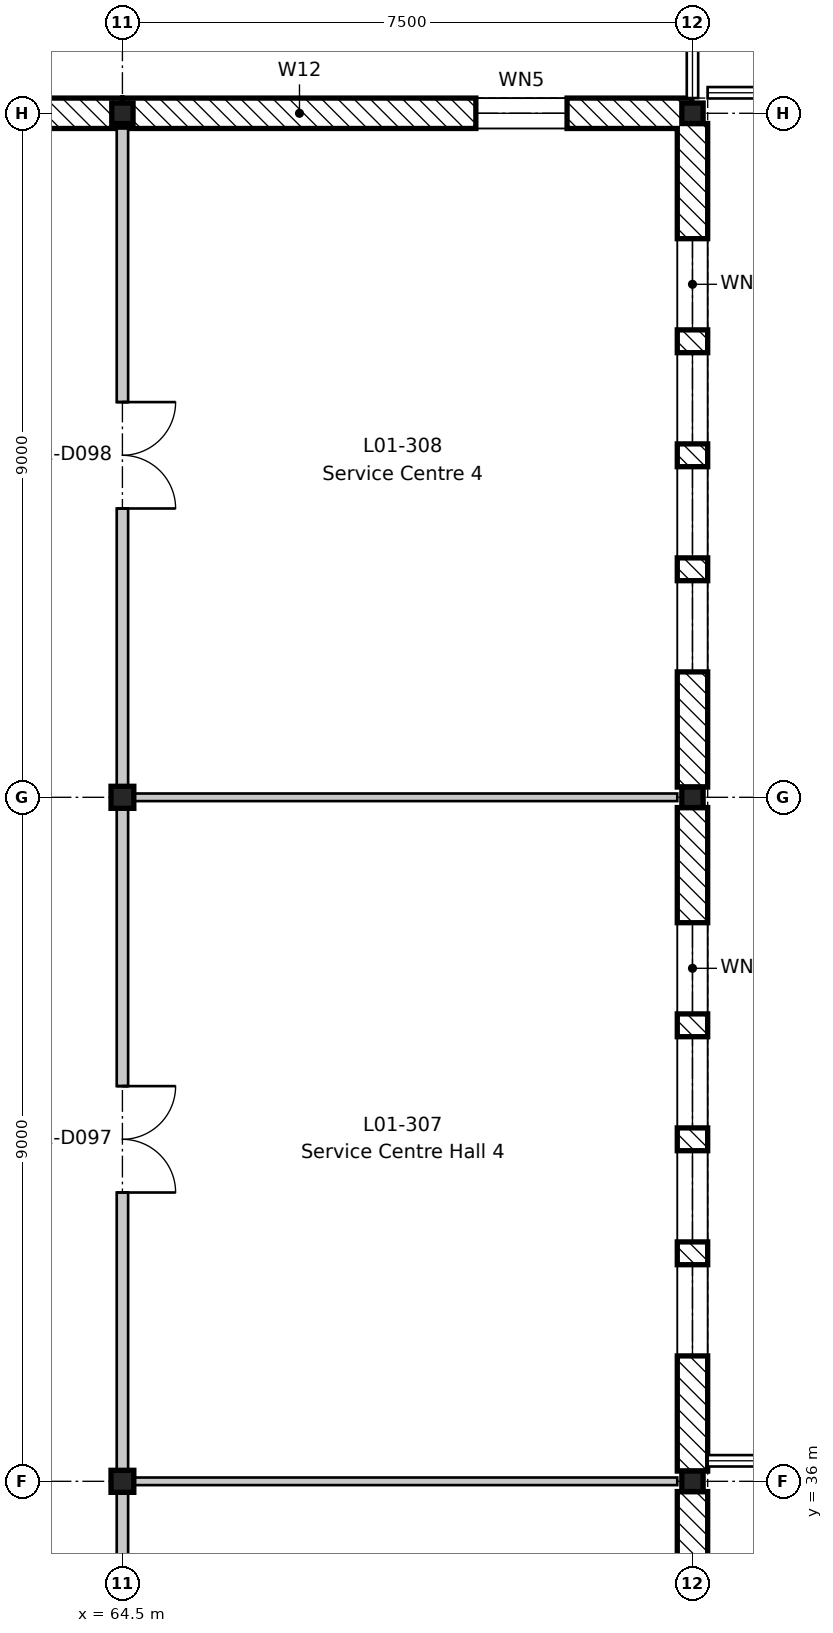
"""IFC4 building model, lengths in metres.
Left out: names, types, materials, properties, quantities, classifications, styles, units other than length and angle.
Written with IfcOpenShell. Run it as: python <this file> out.ifc"""

import sys

from ifc_helpers import new_model, si_unit, direction, frame, frame_2d, origin, origin_2d, place, context, subcontext, project, spatial, rectangle, i_section, extrude, element, fill, save


model = new_model("IFC4")
c1 = context("Model", 3, precision=1e-05, world=origin(), true_north=direction((0.0, 1.0)))
c2 = subcontext(c1, "Body", "Model", "MODEL_VIEW")
j1 = project(units=[si_unit("LENGTHUNIT", "METRE"), si_unit("PLANEANGLEUNIT", "RADIAN")], contexts=[c1])
p1 = place(None, origin())
s1 = spatial("IfcSite", under=j1, at=p1, CompositionType="ELEMENT")
p2 = place(p1, origin())
s2 = spatial("IfcBuilding", under=s1, at=p2, CompositionType="ELEMENT")
p3 = place(p2, frame((0.0, 0.0, 5.4)))
s3 = spatial("IfcBuildingStorey", under=s2, at=p3, CompositionType="ELEMENT", Elevation=5.4)
for number, where, z_axis, x_axis in (
    (1, (64.5, 36.0, -0.2), (0.0, 0.0, 1.0), (1.0, 0.0, 0.0)),
    (2, (64.5, 45.0, -0.2), (0.0, 0.0, 1.0), (1.0, 0.0, 0.0)),
):
    element("IfcColumn", number, at=place(p3, frame(where, z_axis=z_axis, x_axis=x_axis)), inside=s3, PredefinedType="COLUMN", context=c2, shape_type="SweptSolid", body=[
        extrude(i_section(OverallWidth=0.3, OverallDepth=0.29, WebThickness=0.009, FlangeThickness=0.014, FilletRadius=0.027, at=origin_2d()), origin(), (0.0, 0.0, 1.0), 4.5),
    ])
for number, where, z_axis, x_axis in (
    (3, (64.5, 54.0, -0.2), (0.0, 0.0, 1.0), (1.0, 0.0, 0.0)),
    (4, (72.0, 36.0, -0.2), (0.0, 0.0, 1.0), (1.0, 0.0, 0.0)),
    (5, (72.0, 45.0, -0.2), (0.0, 0.0, 1.0), (1.0, 0.0, 0.0)),
    (6, (72.0, 54.0, -0.2), (0.0, 0.0, 1.0), (1.0, 0.0, 0.0)),
):
    element("IfcColumn", number, at=place(p3, frame(where, z_axis=z_axis, x_axis=x_axis)), inside=s3, PredefinedType="COLUMN", context=c2, shape_type="SweptSolid", body=[
        extrude(i_section(OverallWidth=0.28, OverallDepth=0.27, WebThickness=0.008, FlangeThickness=0.013, FilletRadius=0.024, at=origin_2d()), origin(), (0.0, 0.0, 1.0), 4.5),
    ])
p4 = place(p3, frame((61.509, 54.0, 0.0), z_axis=(0.0, 0.0, 1.0), x_axis=(1.0, 0.0, 0.0)))
e7 = element("IfcWall", 7, at=p4, inside=s3, PredefinedType="STANDARD", context=c2, shape_type="SweptSolid", body=[
    extrude(rectangle(XDim=2.982, YDim=0.4, at=frame_2d((1.491, 0.0))), origin(), (0.0, 0.0, 1.0), 4.1),
])
p5 = place(p3, frame((64.509, 54.0, 0.0), z_axis=(0.0, 0.0, 1.0), x_axis=(1.0, 0.0, 0.0)))
e8 = element("IfcWall", 8, at=p5, inside=s3, PredefinedType="STANDARD", context=c2, shape_type="SweptSolid", body=[
    extrude(rectangle(XDim=7.482, YDim=0.4, at=frame_2d((3.741, 0.0))), origin(), (0.0, 0.0, 1.0), 3.97),
])
p6 = place(p5, frame((4.641, 0.0, 0.6)))
e9 = element("IfcOpeningElement", 9, at=p6, cuts=e8, PredefinedType="OPENING", context=c2, shape_type="SweptSolid", body=[
    extrude(rectangle(XDim=1.2, YDim=3.0, at=frame_2d((0.6, 1.5))), frame((0.0, 0.21, 0.0), z_axis=(0.0, -1.0, 0.0), x_axis=(1.0, 0.0, 0.0)), (0.0, 0.0, 1.0), 0.42),
])
p7 = place(p3, frame((72.0, 35.865, 0.0), z_axis=(0.0, 0.0, 1.0), x_axis=(0.0, -1.0, 0.0)))
e10 = element("IfcWall", 10, at=p7, inside=s3, PredefinedType="STANDARD", context=c2, shape_type="SweptSolid", body=[
    extrude(rectangle(XDim=8.73, YDim=0.4, at=frame_2d((4.365, 0.0))), origin(), (0.0, 0.0, 1.0), 3.9),
])
p8 = place(p7, frame((6.015, 0.0, 0.6)))
e11 = element("IfcOpeningElement", 11, at=p8, cuts=e10, PredefinedType="OPENING", context=c2, shape_type="SweptSolid", body=[
    extrude(rectangle(XDim=1.2, YDim=3.0, at=frame_2d((0.6, 1.5))), frame((0.0, 0.21, 0.0), z_axis=(0.0, -1.0, 0.0), x_axis=(1.0, 0.0, 0.0)), (0.0, 0.0, 1.0), 0.42),
])
p9 = place(p7, frame((4.515, 0.0, 0.6)))
e12 = element("IfcOpeningElement", 12, at=p9, cuts=e10, PredefinedType="OPENING", context=c2, shape_type="SweptSolid", body=[
    extrude(rectangle(XDim=1.2, YDim=3.0, at=frame_2d((0.6, 1.5))), frame((0.0, 0.21, 0.0), z_axis=(0.0, -1.0, 0.0), x_axis=(1.0, 0.0, 0.0)), (0.0, 0.0, 1.0), 0.42),
])
p10 = place(p7, frame((3.015, 0.0, 0.6)))
e13 = element("IfcOpeningElement", 13, at=p10, cuts=e10, PredefinedType="OPENING", context=c2, shape_type="SweptSolid", body=[
    extrude(rectangle(XDim=1.2, YDim=3.0, at=frame_2d((0.6, 1.5))), frame((0.0, 0.21, 0.0), z_axis=(0.0, -1.0, 0.0), x_axis=(1.0, 0.0, 0.0)), (0.0, 0.0, 1.0), 0.42),
])
p11 = place(p7, frame((1.515, 0.0, 0.6)))
e14 = element("IfcOpeningElement", 14, at=p11, cuts=e10, PredefinedType="OPENING", context=c2, shape_type="SweptSolid", body=[
    extrude(rectangle(XDim=1.2, YDim=3.0, at=frame_2d((0.6, 1.5))), frame((0.0, 0.21, 0.0), z_axis=(0.0, -1.0, 0.0), x_axis=(1.0, 0.0, 0.0)), (0.0, 0.0, 1.0), 0.42),
])
p12 = place(p3, frame((72.0, 44.865, 0.0), z_axis=(0.0, 0.0, 1.0), x_axis=(0.0, -1.0, 0.0)))
e15 = element("IfcWall", 15, at=p12, inside=s3, PredefinedType="STANDARD", context=c2, shape_type="SweptSolid", body=[
    extrude(rectangle(XDim=8.73, YDim=0.4, at=frame_2d((4.365, 0.0))), origin(), (0.0, 0.0, 1.0), 3.9),
])
p13 = place(p12, frame((6.015, 0.0, 0.6)))
e16 = element("IfcOpeningElement", 16, at=p13, cuts=e15, PredefinedType="OPENING", context=c2, shape_type="SweptSolid", body=[
    extrude(rectangle(XDim=1.2, YDim=3.0, at=frame_2d((0.6, 1.5))), frame((0.0, 0.21, 0.0), z_axis=(0.0, -1.0, 0.0), x_axis=(1.0, 0.0, 0.0)), (0.0, 0.0, 1.0), 0.42),
])
p14 = place(p12, frame((4.515, 0.0, 0.6)))
e17 = element("IfcOpeningElement", 17, at=p14, cuts=e15, PredefinedType="OPENING", context=c2, shape_type="SweptSolid", body=[
    extrude(rectangle(XDim=1.2, YDim=3.0, at=frame_2d((0.6, 1.5))), frame((0.0, 0.21, 0.0), z_axis=(0.0, -1.0, 0.0), x_axis=(1.0, 0.0, 0.0)), (0.0, 0.0, 1.0), 0.42),
])
p15 = place(p12, frame((3.015, 0.0, 0.6)))
e18 = element("IfcOpeningElement", 18, at=p15, cuts=e15, PredefinedType="OPENING", context=c2, shape_type="SweptSolid", body=[
    extrude(rectangle(XDim=1.2, YDim=3.0, at=frame_2d((0.6, 1.5))), frame((0.0, 0.21, 0.0), z_axis=(0.0, -1.0, 0.0), x_axis=(1.0, 0.0, 0.0)), (0.0, 0.0, 1.0), 0.42),
])
p16 = place(p12, frame((1.515, 0.0, 0.6)))
e19 = element("IfcOpeningElement", 19, at=p16, cuts=e15, PredefinedType="OPENING", context=c2, shape_type="SweptSolid", body=[
    extrude(rectangle(XDim=1.2, YDim=3.0, at=frame_2d((0.6, 1.5))), frame((0.0, 0.21, 0.0), z_axis=(0.0, -1.0, 0.0), x_axis=(1.0, 0.0, 0.0)), (0.0, 0.0, 1.0), 0.42),
])
p17 = place(p3, frame((72.0, 53.865, 0.0), z_axis=(0.0, 0.0, 1.0), x_axis=(0.0, -1.0, 0.0)))
e20 = element("IfcWall", 20, at=p17, inside=s3, PredefinedType="STANDARD", context=c2, shape_type="SweptSolid", body=[
    extrude(rectangle(XDim=8.73, YDim=0.4, at=frame_2d((4.365, 0.0))), origin(), (0.0, 0.0, 1.0), 3.9),
])
p18 = place(p17, frame((6.015, 0.0, 0.6)))
e21 = element("IfcOpeningElement", 21, at=p18, cuts=e20, PredefinedType="OPENING", context=c2, shape_type="SweptSolid", body=[
    extrude(rectangle(XDim=1.2, YDim=3.0, at=frame_2d((0.6, 1.5))), frame((0.0, 0.21, 0.0), z_axis=(0.0, -1.0, 0.0), x_axis=(1.0, 0.0, 0.0)), (0.0, 0.0, 1.0), 0.42),
])
p19 = place(p17, frame((4.515, 0.0, 0.6)))
e22 = element("IfcOpeningElement", 22, at=p19, cuts=e20, PredefinedType="OPENING", context=c2, shape_type="SweptSolid", body=[
    extrude(rectangle(XDim=1.2, YDim=3.0, at=frame_2d((0.6, 1.5))), frame((0.0, 0.21, 0.0), z_axis=(0.0, -1.0, 0.0), x_axis=(1.0, 0.0, 0.0)), (0.0, 0.0, 1.0), 0.42),
])
p20 = place(p17, frame((3.015, 0.0, 0.6)))
e23 = element("IfcOpeningElement", 23, at=p20, cuts=e20, PredefinedType="OPENING", context=c2, shape_type="SweptSolid", body=[
    extrude(rectangle(XDim=1.2, YDim=3.0, at=frame_2d((0.6, 1.5))), frame((0.0, 0.21, 0.0), z_axis=(0.0, -1.0, 0.0), x_axis=(1.0, 0.0, 0.0)), (0.0, 0.0, 1.0), 0.42),
])
p21 = place(p17, frame((1.515, 0.0, 0.6)))
e24 = element("IfcOpeningElement", 24, at=p21, cuts=e20, PredefinedType="OPENING", context=c2, shape_type="SweptSolid", body=[
    extrude(rectangle(XDim=1.2, YDim=3.0, at=frame_2d((0.6, 1.5))), frame((0.0, 0.21, 0.0), z_axis=(0.0, -1.0, 0.0), x_axis=(1.0, 0.0, 0.0)), (0.0, 0.0, 1.0), 0.42),
])
for number, where, z_axis, x_axis in (
    (25, (64.575, 36.0, 0.0), (0.0, 0.0, 1.0), (1.0, 0.0, 0.0)),
    (26, (64.575, 45.0, 0.0), (0.0, 0.0, 1.0), (1.0, 0.0, 0.0)),
):
    element("IfcWall", number, at=place(p3, frame(where, z_axis=z_axis, x_axis=x_axis)), inside=s3, PredefinedType="PARTITIONING", context=c2, shape_type="SweptSolid", body=[
        extrude(rectangle(XDim=7.225, YDim=0.1, at=frame_2d((3.613, 0.0))), origin(), (0.0, 0.0, 1.0), 3.95),
    ])
p22 = place(p3, frame((64.5, 9.0, 0.0), z_axis=(0.0, 0.0, 1.0), x_axis=(0.0, 1.0, 0.0)))
e27 = element("IfcWall", 27, at=p22, inside=s3, PredefinedType="PARTITIONING", context=c2, shape_type="SweptSolid", body=[
    extrude(rectangle(XDim=44.8, YDim=0.15, at=frame_2d((22.4, 0.0))), origin(), (0.0, 0.0, 1.0), 3.78),
])
p23 = place(p22, frame((3.8, 0.0, 0.0)))
e28 = element("IfcOpeningElement", 28, at=p23, cuts=e27, PredefinedType="OPENING", context=c2, shape_type="SweptSolid", body=[
    extrude(rectangle(XDim=1.4, YDim=2.1, at=frame_2d((0.7, 1.05))), frame((0.0, 0.085, 0.0), z_axis=(0.0, -1.0, 0.0), x_axis=(1.0, 0.0, 0.0)), (0.0, 0.0, 1.0), 0.17),
])
p24 = place(p22, frame((12.8, 0.0, 0.0)))
e29 = element("IfcOpeningElement", 29, at=p24, cuts=e27, PredefinedType="OPENING", context=c2, shape_type="SweptSolid", body=[
    extrude(rectangle(XDim=1.4, YDim=2.1, at=frame_2d((0.7, 1.05))), frame((0.0, 0.085, 0.0), z_axis=(0.0, -1.0, 0.0), x_axis=(1.0, 0.0, 0.0)), (0.0, 0.0, 1.0), 0.17),
])
p25 = place(p22, frame((21.8, 0.0, 0.0)))
e30 = element("IfcOpeningElement", 30, at=p25, cuts=e27, PredefinedType="OPENING", context=c2, shape_type="SweptSolid", body=[
    extrude(rectangle(XDim=1.4, YDim=2.1, at=frame_2d((0.7, 1.05))), frame((0.0, 0.085, 0.0), z_axis=(0.0, -1.0, 0.0), x_axis=(1.0, 0.0, 0.0)), (0.0, 0.0, 1.0), 0.17),
])
p26 = place(p22, frame((30.8, 0.0, 0.0)))
e31 = element("IfcOpeningElement", 31, at=p26, cuts=e27, PredefinedType="OPENING", context=c2, shape_type="SweptSolid", body=[
    extrude(rectangle(XDim=1.4, YDim=2.1, at=frame_2d((0.7, 1.05))), frame((0.0, 0.085, 0.0), z_axis=(0.0, -1.0, 0.0), x_axis=(1.0, 0.0, 0.0)), (0.0, 0.0, 1.0), 0.17),
])
p27 = place(p22, frame((39.8, 0.0, 0.0)))
e32 = element("IfcOpeningElement", 32, at=p27, cuts=e27, PredefinedType="OPENING", context=c2, shape_type="SweptSolid", body=[
    extrude(rectangle(XDim=1.4, YDim=2.1, at=frame_2d((0.7, 1.05))), frame((0.0, 0.085, 0.0), z_axis=(0.0, -1.0, 0.0), x_axis=(1.0, 0.0, 0.0)), (0.0, 0.0, 1.0), 0.17),
])
p28 = place(p6, origin())
e33 = element("IfcWindow", 33, at=p28, inside=s3, PartitioningType="SINGLE_PANEL", PredefinedType="WINDOW", context=c2, shape_type="SweptSolid", body=[
    extrude(rectangle(XDim=1.2, YDim=3.0, at=frame_2d((0.6, 1.5))), frame((0.0, 0.03, 0.0), z_axis=(0.0, -1.0, 0.0), x_axis=(1.0, 0.0, 0.0)), (0.0, 0.0, 1.0), 0.06),
])
fill(e9, e33)
p29 = place(p13, origin())
e34 = element("IfcWindow", 34, at=p29, inside=s3, PartitioningType="SINGLE_PANEL", PredefinedType="WINDOW", context=c2, shape_type="SweptSolid", body=[
    extrude(rectangle(XDim=1.2, YDim=3.0, at=frame_2d((0.6, 1.5))), frame((0.0, 0.03, 0.0), z_axis=(0.0, -1.0, 0.0), x_axis=(1.0, 0.0, 0.0)), (0.0, 0.0, 1.0), 0.06),
])
fill(e16, e34)
p30 = place(p14, origin())
e35 = element("IfcWindow", 35, at=p30, inside=s3, PartitioningType="SINGLE_PANEL", PredefinedType="WINDOW", context=c2, shape_type="SweptSolid", body=[
    extrude(rectangle(XDim=1.2, YDim=3.0, at=frame_2d((0.6, 1.5))), frame((0.0, 0.03, 0.0), z_axis=(0.0, -1.0, 0.0), x_axis=(1.0, 0.0, 0.0)), (0.0, 0.0, 1.0), 0.06),
])
fill(e17, e35)
p31 = place(p15, origin())
e36 = element("IfcWindow", 36, at=p31, inside=s3, PartitioningType="SINGLE_PANEL", PredefinedType="WINDOW", context=c2, shape_type="SweptSolid", body=[
    extrude(rectangle(XDim=1.2, YDim=3.0, at=frame_2d((0.6, 1.5))), frame((0.0, 0.03, 0.0), z_axis=(0.0, -1.0, 0.0), x_axis=(1.0, 0.0, 0.0)), (0.0, 0.0, 1.0), 0.06),
])
fill(e18, e36)
p32 = place(p16, origin())
e37 = element("IfcWindow", 37, at=p32, inside=s3, PartitioningType="SINGLE_PANEL", PredefinedType="WINDOW", context=c2, shape_type="SweptSolid", body=[
    extrude(rectangle(XDim=1.2, YDim=3.0, at=frame_2d((0.6, 1.5))), frame((0.0, 0.03, 0.0), z_axis=(0.0, -1.0, 0.0), x_axis=(1.0, 0.0, 0.0)), (0.0, 0.0, 1.0), 0.06),
])
fill(e19, e37)
p33 = place(p18, origin())
e38 = element("IfcWindow", 38, at=p33, inside=s3, PartitioningType="SINGLE_PANEL", PredefinedType="WINDOW", context=c2, shape_type="SweptSolid", body=[
    extrude(rectangle(XDim=1.2, YDim=3.0, at=frame_2d((0.6, 1.5))), frame((0.0, 0.03, 0.0), z_axis=(0.0, -1.0, 0.0), x_axis=(1.0, 0.0, 0.0)), (0.0, 0.0, 1.0), 0.06),
])
fill(e21, e38)
p34 = place(p19, origin())
e39 = element("IfcWindow", 39, at=p34, inside=s3, PartitioningType="SINGLE_PANEL", PredefinedType="WINDOW", context=c2, shape_type="SweptSolid", body=[
    extrude(rectangle(XDim=1.2, YDim=3.0, at=frame_2d((0.6, 1.5))), frame((0.0, 0.03, 0.0), z_axis=(0.0, -1.0, 0.0), x_axis=(1.0, 0.0, 0.0)), (0.0, 0.0, 1.0), 0.06),
])
fill(e22, e39)
p35 = place(p20, origin())
e40 = element("IfcWindow", 40, at=p35, inside=s3, PartitioningType="SINGLE_PANEL", PredefinedType="WINDOW", context=c2, shape_type="SweptSolid", body=[
    extrude(rectangle(XDim=1.2, YDim=3.0, at=frame_2d((0.6, 1.5))), frame((0.0, 0.03, 0.0), z_axis=(0.0, -1.0, 0.0), x_axis=(1.0, 0.0, 0.0)), (0.0, 0.0, 1.0), 0.06),
])
fill(e23, e40)
p36 = place(p21, origin())
e41 = element("IfcWindow", 41, at=p36, inside=s3, PartitioningType="SINGLE_PANEL", PredefinedType="WINDOW", context=c2, shape_type="SweptSolid", body=[
    extrude(rectangle(XDim=1.2, YDim=3.0, at=frame_2d((0.6, 1.5))), frame((0.0, 0.03, 0.0), z_axis=(0.0, -1.0, 0.0), x_axis=(1.0, 0.0, 0.0)), (0.0, 0.0, 1.0), 0.06),
])
fill(e24, e41)
p37 = place(p26, frame((1.4, 0.0, 0.0), z_axis=(0.0, 0.0, 1.0), x_axis=(-1.0, 0.0, 0.0)))
e42 = element("IfcDoor", 42, at=p37, inside=s3, OperationType="DOUBLE_DOOR_SINGLE_SWING", PredefinedType="DOOR", context=c2, shape_type="SweptSolid", body=[
    extrude(rectangle(XDim=1.4, YDim=2.1, at=frame_2d((0.7, 1.05))), frame((0.0, 0.025, 0.0), z_axis=(0.0, -1.0, 0.0), x_axis=(1.0, 0.0, 0.0)), (0.0, 0.0, 1.0), 0.05),
])
fill(e31, e42)
p38 = place(p27, frame((1.4, 0.0, 0.0), z_axis=(0.0, 0.0, 1.0), x_axis=(-1.0, 0.0, 0.0)))
e43 = element("IfcDoor", 43, at=p38, inside=s3, OperationType="DOUBLE_DOOR_SINGLE_SWING", PredefinedType="DOOR", context=c2, shape_type="SweptSolid", body=[
    extrude(rectangle(XDim=1.4, YDim=2.1, at=frame_2d((0.7, 1.05))), frame((0.0, 0.025, 0.0), z_axis=(0.0, -1.0, 0.0), x_axis=(1.0, 0.0, 0.0)), (0.0, 0.0, 1.0), 0.05),
])
fill(e32, e43)
save(model, sys.argv[1])
